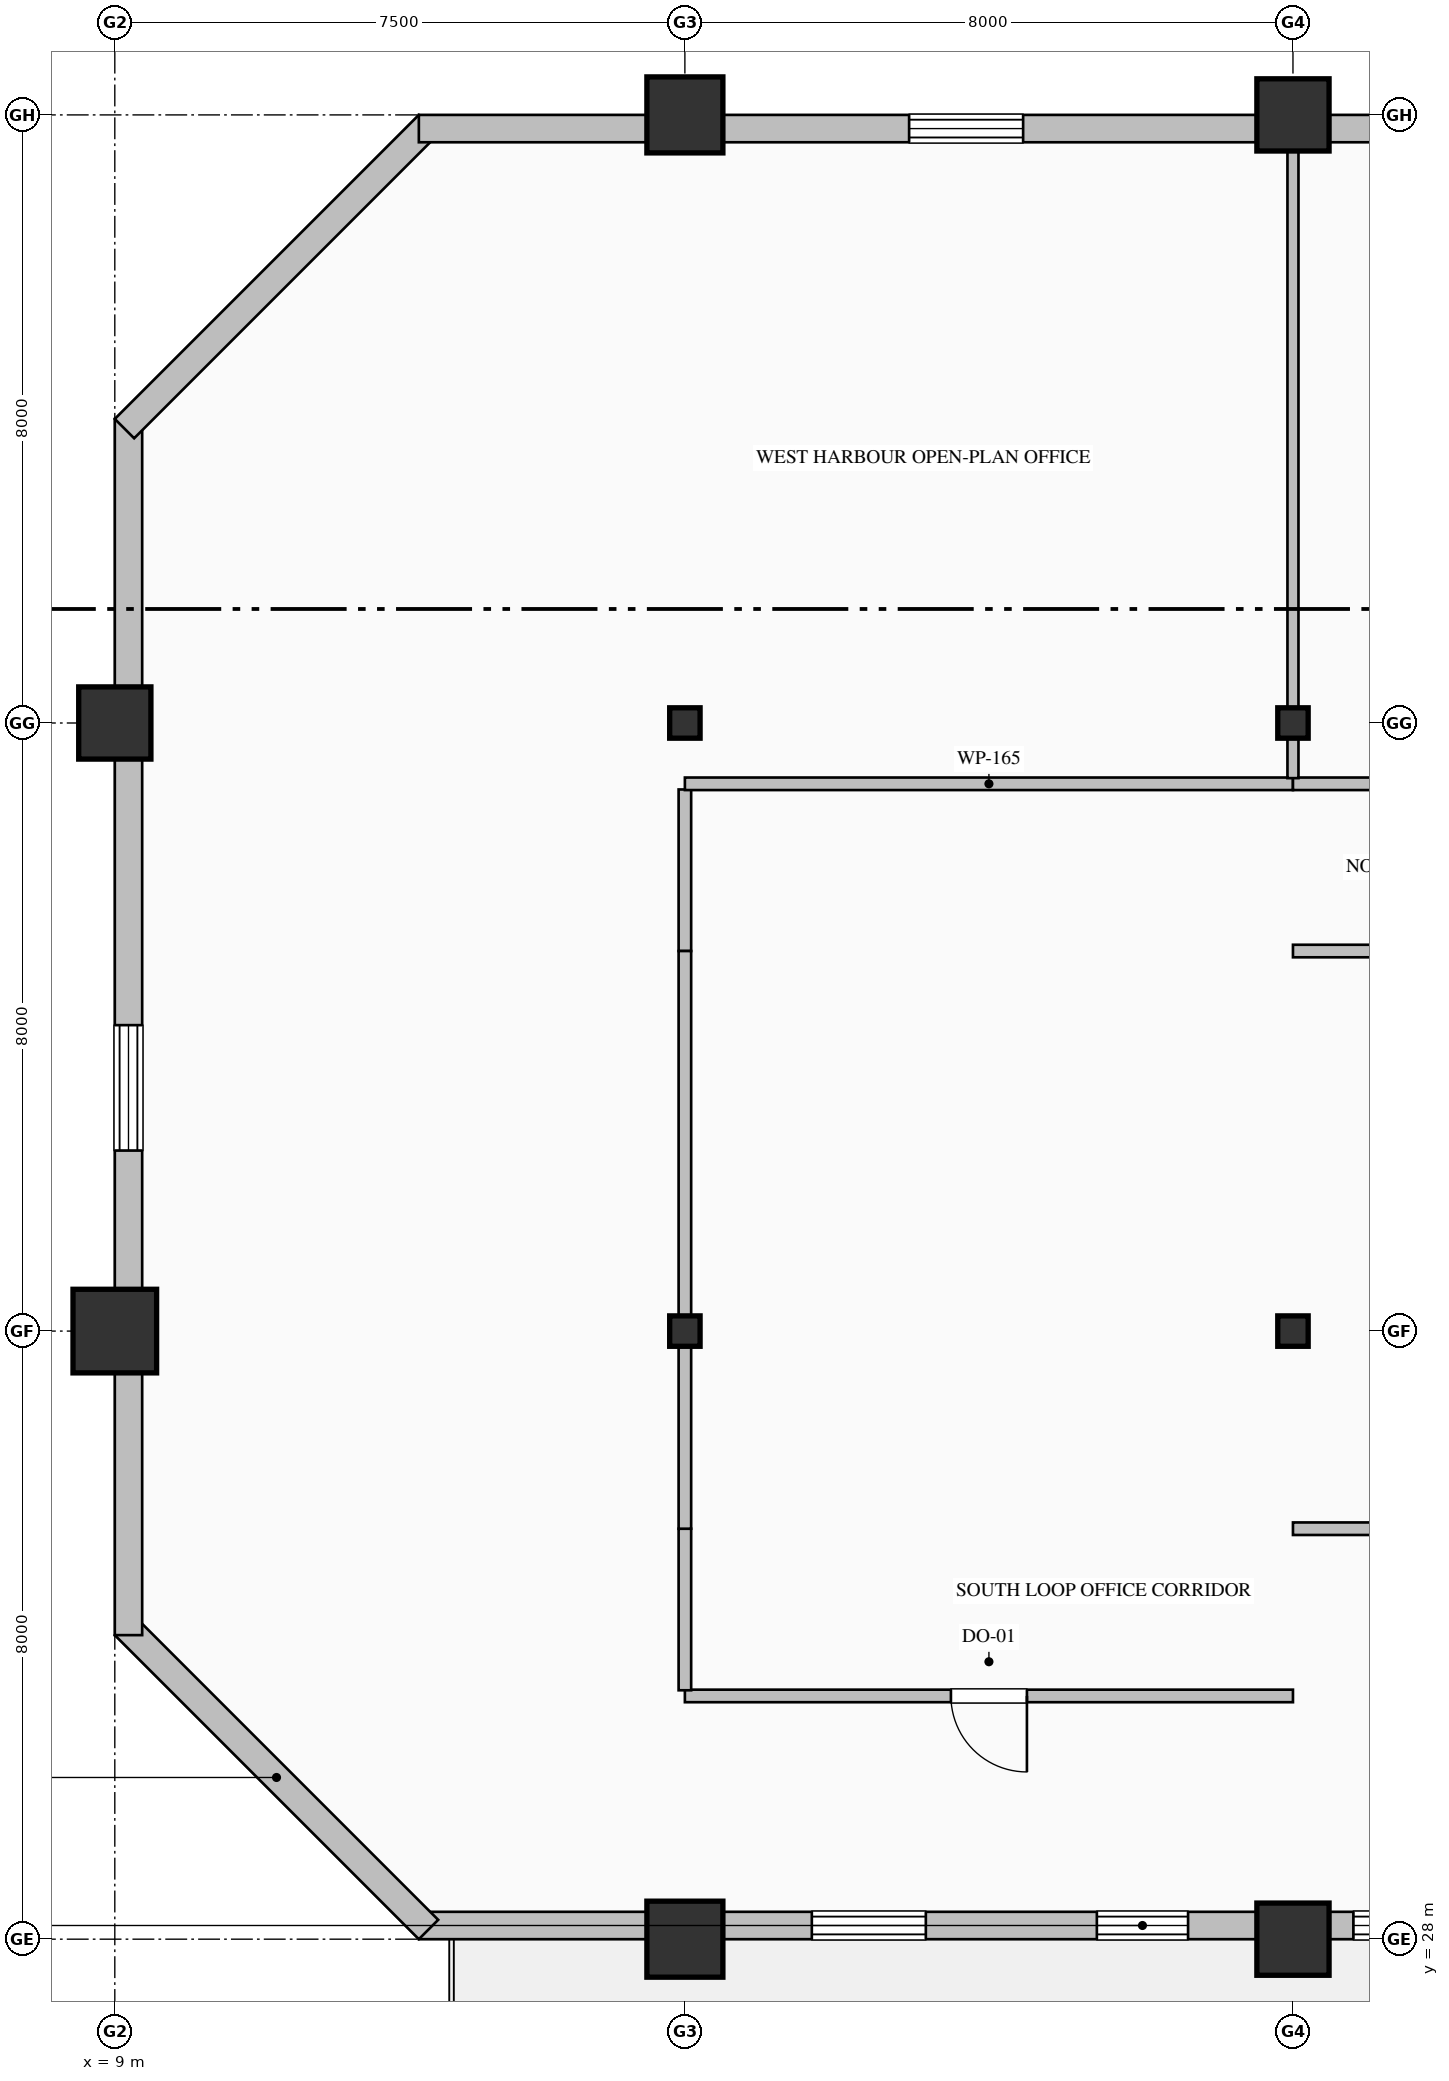
"""IFC4 building model, lengths in metres.
Left out: names, types, materials, properties, quantities, classifications, styles, units other than length and angle.
Written with IfcOpenShell. Run it as: python <this file> out.ifc"""

import sys

from ifc_helpers import new_model, si_unit, direction, frame, frame_2d, origin, origin_2d, place, context, subcontext, project, spatial, rectangle, hollow_rectangle, hollow_circle, i_section, extrude, element, fill, save


model = new_model("IFC4")
c1 = context("Model", 3, precision=1e-05, world=origin(), true_north=direction((0.0, 1.0)))
c2 = subcontext(c1, "Body", "Model", "MODEL_VIEW")
j1 = project(units=[si_unit("LENGTHUNIT", "METRE"), si_unit("PLANEANGLEUNIT", "RADIAN")], contexts=[c1])
p1 = place(None, origin())
s1 = spatial("IfcSite", under=j1, at=p1, CompositionType="ELEMENT")
p2 = place(p1, origin())
s2 = spatial("IfcBuilding", under=s1, at=p2, CompositionType="ELEMENT")
p3 = place(p2, frame((0.0, 0.0, 151.0)))
s3 = spatial("IfcBuildingStorey", under=s2, at=p3, CompositionType="ELEMENT", Elevation=151.0)
p4 = place(p3, frame((9.0, 36.0, 0.0), z_axis=(0.0, 0.0, 1.0), x_axis=(1.0, 0.0, 0.0)))
e1 = element("IfcColumn", 1, at=p4, inside=s3, PredefinedType="COLUMN", context=c2, shape_type="SweptSolid", body=[
    extrude(hollow_rectangle(XDim=1.1, YDim=1.1, WallThickness=0.04, at=origin_2d()), origin(), (0.0, 0.0, 1.0), 4.0),
])
p5 = place(p3, frame((9.0, 44.0, 0.0), z_axis=(0.0, 0.0, 1.0), x_axis=(1.0, 0.0, 0.0)))
e2 = element("IfcColumn", 2, at=p5, inside=s3, PredefinedType="COLUMN", context=c2, shape_type="SweptSolid", body=[
    extrude(hollow_rectangle(XDim=0.95, YDim=0.95, WallThickness=0.036, at=origin_2d()), origin(), (0.0, 0.0, 1.0), 4.0),
])
p6 = place(p3, frame((16.5, 28.0, 0.0), z_axis=(0.0, 0.0, 1.0), x_axis=(1.0, 0.0, 0.0)))
e3 = element("IfcColumn", 3, at=p6, inside=s3, PredefinedType="COLUMN", context=c2, shape_type="SweptSolid", body=[
    extrude(hollow_circle(Radius=0.5, WallThickness=0.036, at=origin_2d()), origin(), (0.0, 0.0, 1.0), 4.0),
])
for number, where, z_axis, x_axis in (
    (4, (16.5, 36.0, 0.0), (0.0, 0.0, 1.0), (1.0, 0.0, 0.0)),
    (5, (16.5, 44.0, 0.0), (0.0, 0.0, 1.0), (1.0, 0.0, 0.0)),
):
    element("IfcColumn", number, at=place(p3, frame(where, z_axis=z_axis, x_axis=x_axis)), inside=s3, PredefinedType="COLUMN", context=c2, shape_type="SweptSolid", body=[
        extrude(i_section(OverallWidth=0.4, OverallDepth=0.4, WebThickness=0.013, FlangeThickness=0.021, FilletRadius=0.022, at=origin_2d()), origin(), (0.0, 0.0, 1.0), 4.0),
    ])
p7 = place(p3, frame((16.5, 52.0, 0.0), z_axis=(0.0, 0.0, 1.0), x_axis=(1.0, 0.0, 0.0)))
e6 = element("IfcColumn", 6, at=p7, inside=s3, PredefinedType="COLUMN", context=c2, shape_type="SweptSolid", body=[
    extrude(hollow_circle(Radius=0.5, WallThickness=0.036, at=origin_2d()), origin(), (0.0, 0.0, 1.0), 4.0),
])
p8 = place(p3, frame((24.5, 28.0, 0.0), z_axis=(0.0, 0.0, 1.0), x_axis=(1.0, 0.0, 0.0)))
e7 = element("IfcColumn", 7, at=p8, inside=s3, PredefinedType="COLUMN", context=c2, shape_type="SweptSolid", body=[
    extrude(hollow_rectangle(XDim=0.95, YDim=0.95, WallThickness=0.036, at=origin_2d()), origin(), (0.0, 0.0, 1.0), 4.0),
])
for number, where, z_axis, x_axis in (
    (8, (24.5, 36.0, 0.0), (0.0, 0.0, 1.0), (1.0, 0.0, 0.0)),
    (9, (24.5, 44.0, 0.0), (0.0, 0.0, 1.0), (1.0, 0.0, 0.0)),
):
    element("IfcColumn", number, at=place(p3, frame(where, z_axis=z_axis, x_axis=x_axis)), inside=s3, PredefinedType="COLUMN", context=c2, shape_type="SweptSolid", body=[
        extrude(i_section(OverallWidth=0.4, OverallDepth=0.4, WebThickness=0.013, FlangeThickness=0.021, FilletRadius=0.022, at=origin_2d()), origin(), (0.0, 0.0, 1.0), 4.0),
    ])
p9 = place(p3, frame((24.5, 52.0, 0.0), z_axis=(0.0, 0.0, 1.0), x_axis=(1.0, 0.0, 0.0)))
e10 = element("IfcColumn", 10, at=p9, inside=s3, PredefinedType="COLUMN", context=c2, shape_type="SweptSolid", body=[
    extrude(hollow_rectangle(XDim=0.95, YDim=0.95, WallThickness=0.036, at=origin_2d()), origin(), (0.0, 0.0, 1.0), 4.0),
])
p10 = place(p3, frame((40.52, 28.18, 0.0), z_axis=(0.0, 0.0, 1.0), x_axis=(-1.0, 0.0, 0.0)))
e11 = element("IfcWall", 11, at=p10, inside=s3, PredefinedType="SOLIDWALL", context=c2, shape_type="SweptSolid", body=[
    extrude(rectangle(XDim=27.52, YDim=0.36, at=frame_2d((13.76, 0.0))), origin(), (0.0, 0.0, 1.0), 3.165),
])
p11 = place(p10, frame((2.775, 0.0, 0.85)))
e12 = element("IfcOpeningElement", 12, at=p11, cuts=e11, PredefinedType="OPENING", context=c2, shape_type="SweptSolid", body=[
    extrude(rectangle(XDim=1.65, YDim=1.95, at=frame_2d((0.825, 0.975))), frame((0.0, 0.19, 0.0), z_axis=(0.0, -1.0, 0.0), x_axis=(1.0, 0.0, 0.0)), (0.0, 0.0, 1.0), 0.38),
])
p12 = place(p10, frame((13.575, 0.0, 0.85)))
e13 = element("IfcOpeningElement", 13, at=p12, cuts=e11, PredefinedType="OPENING", context=c2, shape_type="SweptSolid", body=[
    extrude(rectangle(XDim=1.65, YDim=1.95, at=frame_2d((0.825, 0.975))), frame((0.0, 0.19, 0.0), z_axis=(0.0, -1.0, 0.0), x_axis=(1.0, 0.0, 0.0)), (0.0, 0.0, 1.0), 0.38),
])
p13 = place(p10, frame((17.4, 0.0, 0.7)))
e14 = element("IfcOpeningElement", 14, at=p13, cuts=e11, PredefinedType="OPENING", context=c2, shape_type="SweptSolid", body=[
    extrude(rectangle(XDim=1.2, YDim=1.85, at=frame_2d((0.6, 0.925))), frame((0.0, 0.19, 0.0), z_axis=(0.0, -1.0, 0.0), x_axis=(1.0, 0.0, 0.0)), (0.0, 0.0, 1.0), 0.38),
])
p14 = place(p10, frame((20.85, 0.0, 0.85)))
e15 = element("IfcOpeningElement", 15, at=p14, cuts=e11, PredefinedType="OPENING", context=c2, shape_type="SweptSolid", body=[
    extrude(rectangle(XDim=1.5, YDim=1.95, at=frame_2d((0.75, 0.975))), frame((0.0, 0.19, 0.0), z_axis=(0.0, -1.0, 0.0), x_axis=(1.0, 0.0, 0.0)), (0.0, 0.0, 1.0), 0.38),
])
p15 = place(p10, frame((11.395, 0.0, 0.0)))
e16 = element("IfcOpeningElement", 16, at=p15, cuts=e11, PredefinedType="OPENING", context=c2, shape_type="SweptSolid", body=[
    extrude(rectangle(XDim=1.25, YDim=2.25, at=frame_2d((0.625, 1.125))), frame((0.0, 0.19, 0.0), z_axis=(0.0, -1.0, 0.0), x_axis=(1.0, 0.0, 0.0)), (0.0, 0.0, 1.0), 0.38),
])
p16 = place(p3, frame((13.127, 28.127, 0.0), z_axis=(0.0, 0.0, 1.0), x_axis=(-0.707106781187, 0.707106781187, 0.0)))
e17 = element("IfcWall", 17, at=p16, inside=s3, PredefinedType="SOLIDWALL", context=c2, shape_type="SweptSolid", body=[
    extrude(rectangle(XDim=5.657, YDim=0.36, at=frame_2d((2.828, 0.0))), origin(), (0.0, 0.0, 1.0), 3.765),
])
p17 = place(p3, frame((9.18, 32.0, 0.0), z_axis=(0.0, 0.0, 1.0), x_axis=(0.0, 1.0, 0.0)))
e18 = element("IfcWall", 18, at=p17, inside=s3, PredefinedType="SOLIDWALL", context=c2, shape_type="SweptSolid", body=[
    extrude(rectangle(XDim=16.0, YDim=0.36, at=frame_2d((8.0, 0.0))), origin(), (0.0, 0.0, 1.0), 3.265),
])
p18 = place(p17, frame((6.375, 0.0, 0.85)))
e19 = element("IfcOpeningElement", 19, at=p18, cuts=e18, PredefinedType="OPENING", context=c2, shape_type="SweptSolid", body=[
    extrude(rectangle(XDim=1.65, YDim=1.95, at=frame_2d((0.825, 0.975))), frame((0.0, 0.19, 0.0), z_axis=(0.0, -1.0, 0.0), x_axis=(1.0, 0.0, 0.0)), (0.0, 0.0, 1.0), 0.38),
])
p19 = place(p3, frame((9.127, 47.873, 0.0), z_axis=(0.0, 0.0, 1.0), x_axis=(0.707106781187, 0.707106781187, 0.0)))
e20 = element("IfcWall", 20, at=p19, inside=s3, PredefinedType="SOLIDWALL", context=c2, shape_type="SweptSolid", body=[
    extrude(rectangle(XDim=5.657, YDim=0.36, at=frame_2d((2.828, 0.0))), origin(), (0.0, 0.0, 1.0), 3.765),
])
p20 = place(p3, frame((13.0, 51.82, 0.0), z_axis=(0.0, 0.0, 1.0), x_axis=(1.0, 0.0, 0.0)))
e21 = element("IfcWall", 21, at=p20, inside=s3, PredefinedType="SOLIDWALL", context=c2, shape_type="SweptSolid", body=[
    extrude(rectangle(XDim=27.52, YDim=0.36, at=frame_2d((13.76, 0.0))), origin(), (0.0, 0.0, 1.0), 3.265),
])
p21 = place(p20, frame((6.45, 0.0, 0.85)))
e22 = element("IfcOpeningElement", 22, at=p21, cuts=e21, PredefinedType="OPENING", context=c2, shape_type="SweptSolid", body=[
    extrude(rectangle(XDim=1.5, YDim=1.95, at=frame_2d((0.75, 0.975))), frame((0.0, 0.19, 0.0), z_axis=(0.0, -1.0, 0.0), x_axis=(1.0, 0.0, 0.0)), (0.0, 0.0, 1.0), 0.38),
])
p22 = place(p20, frame((13.8, 0.0, 0.7)))
e23 = element("IfcOpeningElement", 23, at=p22, cuts=e21, PredefinedType="OPENING", context=c2, shape_type="SweptSolid", body=[
    extrude(rectangle(XDim=1.2, YDim=1.85, at=frame_2d((0.6, 0.925))), frame((0.0, 0.19, 0.0), z_axis=(0.0, -1.0, 0.0), x_axis=(1.0, 0.0, 0.0)), (0.0, 0.0, 1.0), 0.38),
])
p23 = place(p3, frame((24.5, 31.2, 0.0), z_axis=(0.0, 0.0, 1.0), x_axis=(-1.0, 0.0, 0.0)))
e24 = element("IfcWall", 24, at=p23, inside=s3, PredefinedType="PARTITIONING", context=c2, shape_type="SweptSolid", body=[
    extrude(rectangle(XDim=8.0, YDim=0.165, at=frame_2d((4.0, 0.0))), origin(), (0.0, 0.0, 1.0), 3.765),
])
p24 = place(p23, frame((3.5, 0.0, 0.0)))
e25 = element("IfcOpeningElement", 25, at=p24, cuts=e24, PredefinedType="OPENING", context=c2, shape_type="SweptSolid", body=[
    extrude(rectangle(XDim=1.0, YDim=2.15, at=frame_2d((0.5, 1.075))), frame((0.0, 0.093, 0.0), z_axis=(0.0, -1.0, 0.0), x_axis=(1.0, 0.0, 0.0)), (0.0, 0.0, 1.0), 0.185),
])
p25 = place(p3, frame((16.5, 31.274, 0.0), z_axis=(0.0, 0.0, 1.0), x_axis=(0.0, 1.0, 0.0)))
e26 = element("IfcWall", 26, at=p25, inside=s3, PredefinedType="PARTITIONING", context=c2, shape_type="SweptSolid", body=[
    extrude(rectangle(XDim=2.125, YDim=0.165, at=frame_2d((1.063, 0.0))), origin(), (0.0, 0.0, 1.0), 3.157),
])
p26 = place(p3, frame((24.5, 33.4, 0.0), z_axis=(0.0, 0.0, 1.0), x_axis=(1.0, 0.0, 0.0)))
e27 = element("IfcWall", 27, at=p26, inside=s3, PredefinedType="PARTITIONING", context=c2, shape_type="SweptSolid", body=[
    extrude(rectangle(XDim=6.5, YDim=0.165, at=frame_2d((3.25, 0.0))), origin(), (0.0, 0.0, 1.0), 3.765),
])
p27 = place(p26, frame((2.75, 0.0, 0.0)))
e28 = element("IfcOpeningElement", 28, at=p27, cuts=e27, PredefinedType="OPENING", context=c2, shape_type="SweptSolid", body=[
    extrude(rectangle(XDim=1.0, YDim=2.15, at=frame_2d((0.5, 1.075))), frame((0.0, 0.093, 0.0), z_axis=(0.0, -1.0, 0.0), x_axis=(1.0, 0.0, 0.0)), (0.0, 0.0, 1.0), 0.185),
])
p28 = place(p3, frame((16.5, 41.0, 0.0), z_axis=(0.0, 0.0, 1.0), x_axis=(0.0, 1.0, 0.0)))
e29 = element("IfcWall", 29, at=p28, inside=s3, PredefinedType="PARTITIONING", context=c2, shape_type="SweptSolid", body=[
    extrude(rectangle(XDim=2.125, YDim=0.165, at=frame_2d((1.063, 0.0))), origin(), (0.0, 0.0, 1.0), 3.157),
])
p29 = place(p3, frame((16.5, 43.2, 0.0), z_axis=(0.0, 0.0, 1.0), x_axis=(1.0, 0.0, 0.0)))
e30 = element("IfcWall", 30, at=p29, inside=s3, PredefinedType="PARTITIONING", context=c2, shape_type="SweptSolid", body=[
    extrude(rectangle(XDim=8.0, YDim=0.165, at=frame_2d((4.0, 0.0))), origin(), (0.0, 0.0, 1.0), 3.765),
])
p30 = place(p3, frame((24.5, 43.2, 0.0), z_axis=(0.0, 0.0, 1.0), x_axis=(1.0, 0.0, 0.0)))
e31 = element("IfcWall", 31, at=p30, inside=s3, PredefinedType="PARTITIONING", context=c2, shape_type="SweptSolid", body=[
    extrude(rectangle(XDim=13.3, YDim=0.165, at=frame_2d((6.65, 0.0))), origin(), (0.0, 0.0, 1.0), 3.765),
])
p31 = place(p30, frame((6.2, 0.0, 0.0)))
e32 = element("IfcOpeningElement", 32, at=p31, cuts=e31, PredefinedType="OPENING", context=c2, shape_type="SweptSolid", body=[
    extrude(rectangle(XDim=0.9, YDim=2.15, at=frame_2d((0.45, 1.075))), frame((0.0, 0.093, 0.0), z_axis=(0.0, -1.0, 0.0), x_axis=(1.0, 0.0, 0.0)), (0.0, 0.0, 1.0), 0.185),
])
p32 = place(p3, frame((31.0, 41.0, 0.0), z_axis=(0.0, 0.0, 1.0), x_axis=(-1.0, 0.0, 0.0)))
e33 = element("IfcWall", 33, at=p32, inside=s3, PredefinedType="PARTITIONING", context=c2, shape_type="SweptSolid", body=[
    extrude(rectangle(XDim=6.5, YDim=0.165, at=frame_2d((3.25, 0.0))), origin(), (0.0, 0.0, 1.0), 3.765),
])
p33 = place(p3, frame((16.5, 33.4, 0.0), z_axis=(0.0, 0.0, 1.0), x_axis=(0.0, 1.0, 0.0)))
e34 = element("IfcWall", 34, at=p33, inside=s3, PredefinedType="PARTITIONING", context=c2, shape_type="SweptSolid", body=[
    extrude(rectangle(XDim=7.6, YDim=0.165, at=frame_2d((3.8, 0.0))), origin(), (0.0, 0.0, 1.0), 3.157),
])
p34 = place(p3, frame((24.5, 51.648, 0.0), z_axis=(0.0, 0.0, 1.0), x_axis=(0.0, -1.0, 0.0)))
e35 = element("IfcWall", 35, at=p34, inside=s3, PredefinedType="PARTITIONING", context=c2, shape_type="SweptSolid", body=[
    extrude(rectangle(XDim=8.374, YDim=0.145, at=frame_2d((4.187, 0.0))), origin(), (0.0, 0.0, 1.0), 3.157),
])
p35 = place(p12, origin())
e36 = element("IfcWindow", 36, at=p35, inside=s3, PartitioningType="DOUBLE_PANEL_VERTICAL", PredefinedType="WINDOW", context=c2, shape_type="SweptSolid", body=[
    extrude(rectangle(XDim=1.65, YDim=1.95, at=frame_2d((0.825, 0.975))), frame((0.0, 0.15, 0.0), z_axis=(0.0, -1.0, 0.0), x_axis=(1.0, 0.0, 0.0)), (0.0, 0.0, 1.0), 0.06),
])
fill(e13, e36)
p36 = place(p13, origin())
e37 = element("IfcWindow", 37, at=p36, inside=s3, PartitioningType="DOUBLE_PANEL_VERTICAL", PredefinedType="WINDOW", context=c2, shape_type="SweptSolid", body=[
    extrude(rectangle(XDim=1.2, YDim=1.85, at=frame_2d((0.6, 0.925))), frame((0.0, 0.15, 0.0), z_axis=(0.0, -1.0, 0.0), x_axis=(1.0, 0.0, 0.0)), (0.0, 0.0, 1.0), 0.06),
])
fill(e14, e37)
p37 = place(p14, origin())
e38 = element("IfcWindow", 38, at=p37, inside=s3, PartitioningType="DOUBLE_PANEL_VERTICAL", PredefinedType="WINDOW", context=c2, shape_type="SweptSolid", body=[
    extrude(rectangle(XDim=1.5, YDim=1.95, at=frame_2d((0.75, 0.975))), frame((0.0, 0.15, 0.0), z_axis=(0.0, -1.0, 0.0), x_axis=(1.0, 0.0, 0.0)), (0.0, 0.0, 1.0), 0.06),
])
fill(e15, e38)
p38 = place(p18, origin())
e39 = element("IfcWindow", 39, at=p38, inside=s3, PartitioningType="DOUBLE_PANEL_VERTICAL", PredefinedType="WINDOW", context=c2, shape_type="SweptSolid", body=[
    extrude(rectangle(XDim=1.65, YDim=1.95, at=frame_2d((0.825, 0.975))), frame((0.0, 0.15, 0.0), z_axis=(0.0, -1.0, 0.0), x_axis=(1.0, 0.0, 0.0)), (0.0, 0.0, 1.0), 0.06),
])
fill(e19, e39)
p39 = place(p21, origin())
e40 = element("IfcWindow", 40, at=p39, inside=s3, PartitioningType="DOUBLE_PANEL_VERTICAL", PredefinedType="WINDOW", context=c2, shape_type="SweptSolid", body=[
    extrude(rectangle(XDim=1.5, YDim=1.95, at=frame_2d((0.75, 0.975))), frame((0.0, 0.15, 0.0), z_axis=(0.0, -1.0, 0.0), x_axis=(1.0, 0.0, 0.0)), (0.0, 0.0, 1.0), 0.06),
])
fill(e22, e40)
p40 = place(p24, origin())
e41 = element("IfcDoor", 41, at=p40, inside=s3, OperationType="SINGLE_SWING_LEFT", PredefinedType="DOOR", context=c2, shape_type="SweptSolid", body=[
    extrude(rectangle(XDim=1.0, YDim=2.15, at=frame_2d((0.5, 1.075))), frame((0.0, 0.025, 0.0), z_axis=(0.0, -1.0, 0.0), x_axis=(1.0, 0.0, 0.0)), (0.0, 0.0, 1.0), 0.05),
])
fill(e25, e41)
save(model, sys.argv[1])
